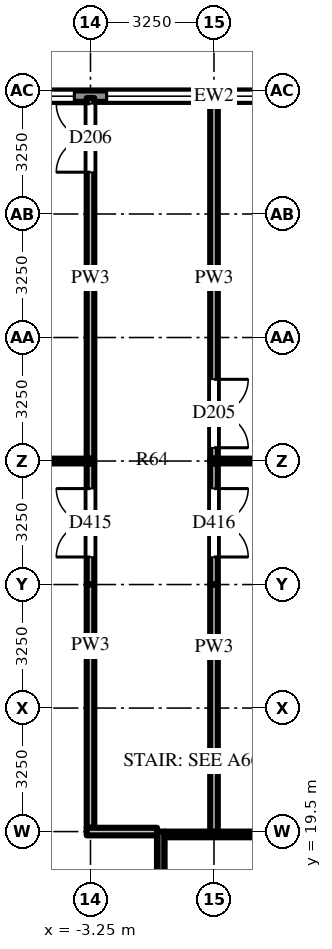
"""IFC4 building model, lengths in metres.
Left out: names, types, materials, properties, quantities, classifications, styles, units other than length and angle.
Written with IfcOpenShell. Run it as: python <this file> out.ifc"""

import sys

from ifc_helpers import new_model, si_unit, direction, frame, frame_2d, origin, place, context, subcontext, project, spatial, rectangle, extrude, source, transform, mapped, element, fill, save


model = new_model("IFC4")
c1 = context("Model", 3, precision=1e-05, world=origin(), true_north=direction((0.0, 1.0)))
c2 = subcontext(c1, "Body", "Model", "MODEL_VIEW")
j1 = project(units=[si_unit("LENGTHUNIT", "METRE"), si_unit("PLANEANGLEUNIT", "RADIAN")], contexts=[c1])
p1 = place(None, origin())
s1 = spatial("IfcSite", under=j1, at=p1, CompositionType="ELEMENT")
p2 = place(p1, origin())
s2 = spatial("IfcBuilding", under=s1, at=p2, CompositionType="ELEMENT")
p3 = place(p2, frame((0.0, 0.0, 19.0)))
s3 = spatial("IfcBuildingStorey", under=s2, at=p3, CompositionType="ELEMENT", Elevation=19.0)
m1 = source(origin(), c2, "Body", "SweptSolid", [
    extrude(rectangle(XDim=6.0, YDim=0.2, at=frame_2d((3.0, 0.0))), origin(), (0.0, 0.0, 1.0), 4.7),
])
p4 = place(p3, frame((-1.4, 13.5, 0.0), z_axis=(0.0, 0.0, 1.0), x_axis=(0.0, 1.0, 0.0)))
e1 = element("IfcWall", 1, at=p4, inside=s3, PredefinedType="SHEAR", context=c2, shape_type="MappedRepresentation", body=[
    mapped(m1, transform((0.0, 0.0, 0.0))),
])
m2 = source(origin(), c2, "Body", "SweptSolid", [
    extrude(rectangle(XDim=2.6, YDim=0.15, at=frame_2d((1.3, 0.0))), origin(), (0.0, 0.0, 1.0), 4.7),
])
p5 = place(p3, frame((-1.3, 19.425, 0.0), z_axis=(0.0, 0.0, 1.0), x_axis=(1.0, 0.0, 0.0)))
e2 = element("IfcWall", 2, at=p5, inside=s3, PredefinedType="SHEAR", context=c2, shape_type="MappedRepresentation", body=[
    mapped(m2, transform((0.0, 0.0, 0.0))),
])
m3 = source(origin(), c2, "Body", "SweptSolid", [
    extrude(rectangle(XDim=71.5, YDim=0.3, at=frame_2d((35.75, 0.0))), origin(), (0.0, 0.0, 1.0), 4.7),
])
p6 = place(p3, frame((35.75, 38.85, 0.0), z_axis=(0.0, 0.0, 1.0), x_axis=(-1.0, 0.0, 0.0)))
e3 = element("IfcWall", 3, at=p6, inside=s3, PredefinedType="SOLIDWALL", context=c2, shape_type="MappedRepresentation", body=[
    mapped(m3, transform((0.0, 0.0, 0.0))),
])
m4 = source(origin(), c2, "Body", "SweptSolid", [
    extrude(rectangle(XDim=2.4, YDim=3.0, at=frame_2d((1.2, 1.5))), frame((0.0, 0.16, 0.0), z_axis=(0.0, -1.0, 0.0), x_axis=(1.0, 0.0, 0.0)), (0.0, 0.0, 1.0), 0.32),
])
p7 = place(p6, frame((0.425, 0.0, 0.9)))
e4 = element("IfcOpeningElement", 4, at=p7, cuts=e3, PredefinedType="OPENING", context=c2, shape_type="MappedRepresentation", body=[
    mapped(m4, transform((0.0, 0.0, 0.0))),
])
p8 = place(p6, frame((3.675, 0.0, 0.9)))
e5 = element("IfcOpeningElement", 5, at=p8, cuts=e3, PredefinedType="OPENING", context=c2, shape_type="MappedRepresentation", body=[
    mapped(m4, transform((0.0, 0.0, 0.0))),
])
p9 = place(p6, frame((6.925, 0.0, 0.9)))
e6 = element("IfcOpeningElement", 6, at=p9, cuts=e3, PredefinedType="OPENING", context=c2, shape_type="MappedRepresentation", body=[
    mapped(m4, transform((0.0, 0.0, 0.0))),
])
p10 = place(p6, frame((10.175, 0.0, 0.9)))
e7 = element("IfcOpeningElement", 7, at=p10, cuts=e3, PredefinedType="OPENING", context=c2, shape_type="MappedRepresentation", body=[
    mapped(m4, transform((0.0, 0.0, 0.0))),
])
p11 = place(p6, frame((13.425, 0.0, 0.9)))
e8 = element("IfcOpeningElement", 8, at=p11, cuts=e3, PredefinedType="OPENING", context=c2, shape_type="MappedRepresentation", body=[
    mapped(m4, transform((0.0, 0.0, 0.0))),
])
p12 = place(p6, frame((16.675, 0.0, 0.9)))
e9 = element("IfcOpeningElement", 9, at=p12, cuts=e3, PredefinedType="OPENING", context=c2, shape_type="MappedRepresentation", body=[
    mapped(m4, transform((0.0, 0.0, 0.0))),
])
p13 = place(p6, frame((19.925, 0.0, 0.9)))
e10 = element("IfcOpeningElement", 10, at=p13, cuts=e3, PredefinedType="OPENING", context=c2, shape_type="MappedRepresentation", body=[
    mapped(m4, transform((0.0, 0.0, 0.0))),
])
p14 = place(p6, frame((23.175, 0.0, 0.9)))
e11 = element("IfcOpeningElement", 11, at=p14, cuts=e3, PredefinedType="OPENING", context=c2, shape_type="MappedRepresentation", body=[
    mapped(m4, transform((0.0, 0.0, 0.0))),
])
p15 = place(p6, frame((26.425, 0.0, 0.9)))
e12 = element("IfcOpeningElement", 12, at=p15, cuts=e3, PredefinedType="OPENING", context=c2, shape_type="MappedRepresentation", body=[
    mapped(m4, transform((0.0, 0.0, 0.0))),
])
p16 = place(p6, frame((29.675, 0.0, 0.9)))
e13 = element("IfcOpeningElement", 13, at=p16, cuts=e3, PredefinedType="OPENING", context=c2, shape_type="MappedRepresentation", body=[
    mapped(m4, transform((0.0, 0.0, 0.0))),
])
p17 = place(p6, frame((32.925, 0.0, 0.9)))
e14 = element("IfcOpeningElement", 14, at=p17, cuts=e3, PredefinedType="OPENING", context=c2, shape_type="MappedRepresentation", body=[
    mapped(m4, transform((0.0, 0.0, 0.0))),
])
p18 = place(p6, frame((36.175, 0.0, 0.9)))
e15 = element("IfcOpeningElement", 15, at=p18, cuts=e3, PredefinedType="OPENING", context=c2, shape_type="MappedRepresentation", body=[
    mapped(m4, transform((0.0, 0.0, 0.0))),
])
p19 = place(p6, frame((39.425, 0.0, 0.9)))
e16 = element("IfcOpeningElement", 16, at=p19, cuts=e3, PredefinedType="OPENING", context=c2, shape_type="MappedRepresentation", body=[
    mapped(m4, transform((0.0, 0.0, 0.0))),
])
p20 = place(p6, frame((42.675, 0.0, 0.9)))
e17 = element("IfcOpeningElement", 17, at=p20, cuts=e3, PredefinedType="OPENING", context=c2, shape_type="MappedRepresentation", body=[
    mapped(m4, transform((0.0, 0.0, 0.0))),
])
p21 = place(p6, frame((45.925, 0.0, 0.9)))
e18 = element("IfcOpeningElement", 18, at=p21, cuts=e3, PredefinedType="OPENING", context=c2, shape_type="MappedRepresentation", body=[
    mapped(m4, transform((0.0, 0.0, 0.0))),
])
p22 = place(p6, frame((49.175, 0.0, 0.9)))
e19 = element("IfcOpeningElement", 19, at=p22, cuts=e3, PredefinedType="OPENING", context=c2, shape_type="MappedRepresentation", body=[
    mapped(m4, transform((0.0, 0.0, 0.0))),
])
p23 = place(p6, frame((52.425, 0.0, 0.9)))
e20 = element("IfcOpeningElement", 20, at=p23, cuts=e3, PredefinedType="OPENING", context=c2, shape_type="MappedRepresentation", body=[
    mapped(m4, transform((0.0, 0.0, 0.0))),
])
p24 = place(p6, frame((55.675, 0.0, 0.9)))
e21 = element("IfcOpeningElement", 21, at=p24, cuts=e3, PredefinedType="OPENING", context=c2, shape_type="MappedRepresentation", body=[
    mapped(m4, transform((0.0, 0.0, 0.0))),
])
p25 = place(p6, frame((58.925, 0.0, 0.9)))
e22 = element("IfcOpeningElement", 22, at=p25, cuts=e3, PredefinedType="OPENING", context=c2, shape_type="MappedRepresentation", body=[
    mapped(m4, transform((0.0, 0.0, 0.0))),
])
p26 = place(p6, frame((62.175, 0.0, 0.9)))
e23 = element("IfcOpeningElement", 23, at=p26, cuts=e3, PredefinedType="OPENING", context=c2, shape_type="MappedRepresentation", body=[
    mapped(m4, transform((0.0, 0.0, 0.0))),
])
p27 = place(p6, frame((65.425, 0.0, 0.9)))
e24 = element("IfcOpeningElement", 24, at=p27, cuts=e3, PredefinedType="OPENING", context=c2, shape_type="MappedRepresentation", body=[
    mapped(m4, transform((0.0, 0.0, 0.0))),
])
p28 = place(p6, frame((68.675, 0.0, 0.9)))
e25 = element("IfcOpeningElement", 25, at=p28, cuts=e3, PredefinedType="OPENING", context=c2, shape_type="MappedRepresentation", body=[
    mapped(m4, transform((0.0, 0.0, 0.0))),
])
m5 = source(origin(), c2, "Body", "SweptSolid", [
    extrude(rectangle(XDim=3.188, YDim=0.2, at=frame_2d((1.594, 0.0))), origin(), (0.0, 0.0, 1.0), 4.7),
])
p29 = place(p3, frame((-3.25, 26.0, 0.0), z_axis=(0.0, 0.0, 1.0), x_axis=(0.0, 1.0, 0.0)))
e26 = element("IfcWall", 26, at=p29, inside=s3, PredefinedType="PARTITIONING", context=c2, shape_type="MappedRepresentation", body=[
    mapped(m5, transform((0.0, 0.0, 0.0))),
])
m6 = source(origin(), c2, "Body", "SweptSolid", [
    extrude(rectangle(XDim=1.8, YDim=2.1, at=frame_2d((0.9, 1.05))), frame((0.0, 0.11, 0.0), z_axis=(0.0, -1.0, 0.0), x_axis=(1.0, 0.0, 0.0)), (0.0, 0.0, 1.0), 0.22),
])
p30 = place(p29, frame((0.725, 0.0, 0.0)))
e27 = element("IfcOpeningElement", 27, at=p30, cuts=e26, PredefinedType="OPENING", context=c2, shape_type="MappedRepresentation", body=[
    mapped(m6, transform((0.0, 0.0, 0.0))),
])
m7 = source(origin(), c2, "Body", "SweptSolid", [
    extrude(rectangle(XDim=6.4, YDim=0.2, at=frame_2d((3.2, 0.0))), origin(), (0.0, 0.0, 1.0), 4.7),
])
p31 = place(p3, frame((-3.25, 26.0, 0.0), z_axis=(0.0, 0.0, 1.0), x_axis=(0.0, -1.0, 0.0)))
e28 = element("IfcWall", 28, at=p31, inside=s3, PredefinedType="PARTITIONING", context=c2, shape_type="MappedRepresentation", body=[
    mapped(m7, transform((0.0, 0.0, 0.0))),
])
m8 = source(origin(), c2, "Body", "SweptSolid", [
    extrude(rectangle(XDim=9.488, YDim=0.2, at=frame_2d((4.744, 0.0))), origin(), (0.0, 0.0, 1.0), 3.918),
])
p32 = place(p3, frame((-3.25, 29.312, 0.0), z_axis=(0.0, 0.0, 1.0), x_axis=(0.0, 1.0, 0.0)))
e29 = element("IfcWall", 29, at=p32, inside=s3, PredefinedType="PARTITIONING", context=c2, shape_type="MappedRepresentation", body=[
    mapped(m8, transform((0.0, 0.0, 0.0))),
])
p33 = place(p32, frame((7.538, 0.0, 0.0)))
e30 = element("IfcOpeningElement", 30, at=p33, cuts=e29, PredefinedType="OPENING", context=c2, shape_type="MappedRepresentation", body=[
    mapped(m6, transform((0.0, 0.0, 0.0))),
])
m9 = source(origin(), c2, "Body", "SweptSolid", [
    extrude(rectangle(XDim=3.188, YDim=0.2, at=frame_2d((1.594, 0.0))), origin(), (0.0, 0.0, 1.0), 3.996),
])
p34 = place(p3, frame((0.0, 29.188, 0.0), z_axis=(0.0, 0.0, 1.0), x_axis=(0.0, -1.0, 0.0)))
e31 = element("IfcWall", 31, at=p34, inside=s3, PredefinedType="PARTITIONING", context=c2, shape_type="MappedRepresentation", body=[
    mapped(m9, transform((0.0, 0.0, 0.0))),
])
p35 = place(p34, frame((0.663, 0.0, 0.0)))
e32 = element("IfcOpeningElement", 32, at=p35, cuts=e31, PredefinedType="OPENING", context=c2, shape_type="MappedRepresentation", body=[
    mapped(m6, transform((0.0, 0.0, 0.0))),
])
m10 = source(origin(), c2, "Body", "SweptSolid", [
    extrude(rectangle(XDim=6.5, YDim=0.2, at=frame_2d((3.25, 0.0))), origin(), (0.0, 0.0, 1.0), 3.996),
])
p36 = place(p3, frame((0.0, 26.0, 0.0), z_axis=(0.0, 0.0, 1.0), x_axis=(0.0, -1.0, 0.0)))
e33 = element("IfcWall", 33, at=p36, inside=s3, PredefinedType="PARTITIONING", context=c2, shape_type="MappedRepresentation", body=[
    mapped(m10, transform((0.0, 0.0, 0.0))),
])
p37 = place(p3, frame((0.0, 38.8, 0.0), z_axis=(0.0, 0.0, 1.0), x_axis=(0.0, -1.0, 0.0)))
e34 = element("IfcWall", 34, at=p37, inside=s3, PredefinedType="PARTITIONING", context=c2, shape_type="MappedRepresentation", body=[
    mapped(m8, transform((0.0, 0.0, 0.0))),
])
p38 = place(p37, frame((7.4, 0.0, 0.0)))
e35 = element("IfcOpeningElement", 35, at=p38, cuts=e34, PredefinedType="OPENING", context=c2, shape_type="MappedRepresentation", body=[
    mapped(m6, transform((0.0, 0.0, 0.0))),
])
m11 = source(origin(), c2, "Body", "SweptSolid", [
    extrude(rectangle(XDim=1.85, YDim=0.2, at=frame_2d((0.925, 0.0))), origin(), (0.0, 0.0, 1.0), 3.996),
])
p39 = place(p3, frame((-1.5, 19.5, 0.0), z_axis=(0.0, 0.0, 1.0), x_axis=(-1.0, 0.0, 0.0)))
e36 = element("IfcWall", 36, at=p39, inside=s3, PredefinedType="PARTITIONING", context=c2, shape_type="MappedRepresentation", body=[
    mapped(m11, transform((0.0, 0.0, 0.0))),
])
m12 = source(origin(), c2, "Body", "SweptSolid", [
    extrude(rectangle(XDim=5.2, YDim=0.125, at=frame_2d((2.6, 0.0))), origin(), (0.0, 0.0, 1.0), 3.762),
])
p40 = place(p3, frame((-8.35, 29.25, 0.0), z_axis=(0.0, 0.0, 1.0), x_axis=(1.0, 0.0, 0.0)))
e37 = element("IfcWall", 37, at=p40, inside=s3, PredefinedType="PARTITIONING", context=c2, shape_type="MappedRepresentation", body=[
    mapped(m12, transform((0.0, 0.0, 0.0))),
])
m13 = source(origin(), c2, "Body", "SweptSolid", [
    extrude(rectangle(XDim=8.45, YDim=0.125, at=frame_2d((4.225, 0.0))), origin(), (0.0, 0.0, 1.0), 3.762),
])
p41 = place(p3, frame((-0.1, 29.25, 0.0), z_axis=(0.0, 0.0, 1.0), x_axis=(1.0, 0.0, 0.0)))
e38 = element("IfcWall", 38, at=p41, inside=s3, PredefinedType="PARTITIONING", context=c2, shape_type="MappedRepresentation", body=[
    mapped(m13, transform((0.0, 0.0, 0.0))),
])
m14 = source(origin(), c2, "Body", "SweptSolid", [
    extrude(rectangle(XDim=2.4, YDim=3.0, at=frame_2d((1.2, 1.5))), frame((0.0, 0.03, 0.0), z_axis=(0.0, -1.0, 0.0), x_axis=(1.0, 0.0, 0.0)), (0.0, 0.0, 1.0), 0.06),
])
p42 = place(p17, origin())
e39 = element("IfcWindow", 39, at=p42, inside=s3, PartitioningType="SINGLE_PANEL", PredefinedType="WINDOW", context=c2, shape_type="MappedRepresentation", body=[
    mapped(m14, transform((0.0, 0.0, 0.0))),
])
fill(e14, e39)
p43 = place(p18, origin())
e40 = element("IfcWindow", 40, at=p43, inside=s3, PartitioningType="SINGLE_PANEL", PredefinedType="WINDOW", context=c2, shape_type="MappedRepresentation", body=[
    mapped(m14, transform((0.0, 0.0, 0.0))),
])
fill(e15, e40)
p44 = place(p19, origin())
e41 = element("IfcWindow", 41, at=p44, inside=s3, PartitioningType="SINGLE_PANEL", PredefinedType="WINDOW", context=c2, shape_type="MappedRepresentation", body=[
    mapped(m14, transform((0.0, 0.0, 0.0))),
])
fill(e16, e41)
m15 = source(origin(), c2, "Body", "SweptSolid", [
    extrude(rectangle(XDim=1.8, YDim=2.1, at=frame_2d((0.9, 1.05))), frame((0.0, 0.025, 0.0), z_axis=(0.0, -1.0, 0.0), x_axis=(1.0, 0.0, 0.0)), (0.0, 0.0, 1.0), 0.05),
])
p45 = place(p30, origin())
e42 = element("IfcDoor", 42, at=p45, inside=s3, OperationType="DOUBLE_DOOR_SINGLE_SWING", PredefinedType="DOOR", context=c2, shape_type="MappedRepresentation", body=[
    mapped(m15, transform((0.0, 0.0, 0.0))),
])
fill(e27, e42)
p46 = place(p35, origin())
e43 = element("IfcDoor", 43, at=p46, inside=s3, OperationType="DOUBLE_DOOR_SINGLE_SWING", PredefinedType="DOOR", context=c2, shape_type="MappedRepresentation", body=[
    mapped(m15, transform((0.0, 0.0, 0.0))),
])
fill(e32, e43)
p47 = place(p38, origin())
e44 = element("IfcDoor", 44, at=p47, inside=s3, OperationType="DOUBLE_DOOR_SINGLE_SWING", PredefinedType="DOOR", context=c2, shape_type="MappedRepresentation", body=[
    mapped(m15, transform((0.0, 0.0, 0.0))),
])
fill(e35, e44)
p48 = place(p33, origin())
e45 = element("IfcDoor", 45, at=p48, inside=s3, OperationType="DOUBLE_DOOR_SINGLE_SWING", PredefinedType="DOOR", context=c2, shape_type="MappedRepresentation", body=[
    mapped(m15, transform((0.0, 0.0, 0.0))),
])
fill(e30, e45)
save(model, sys.argv[1])
